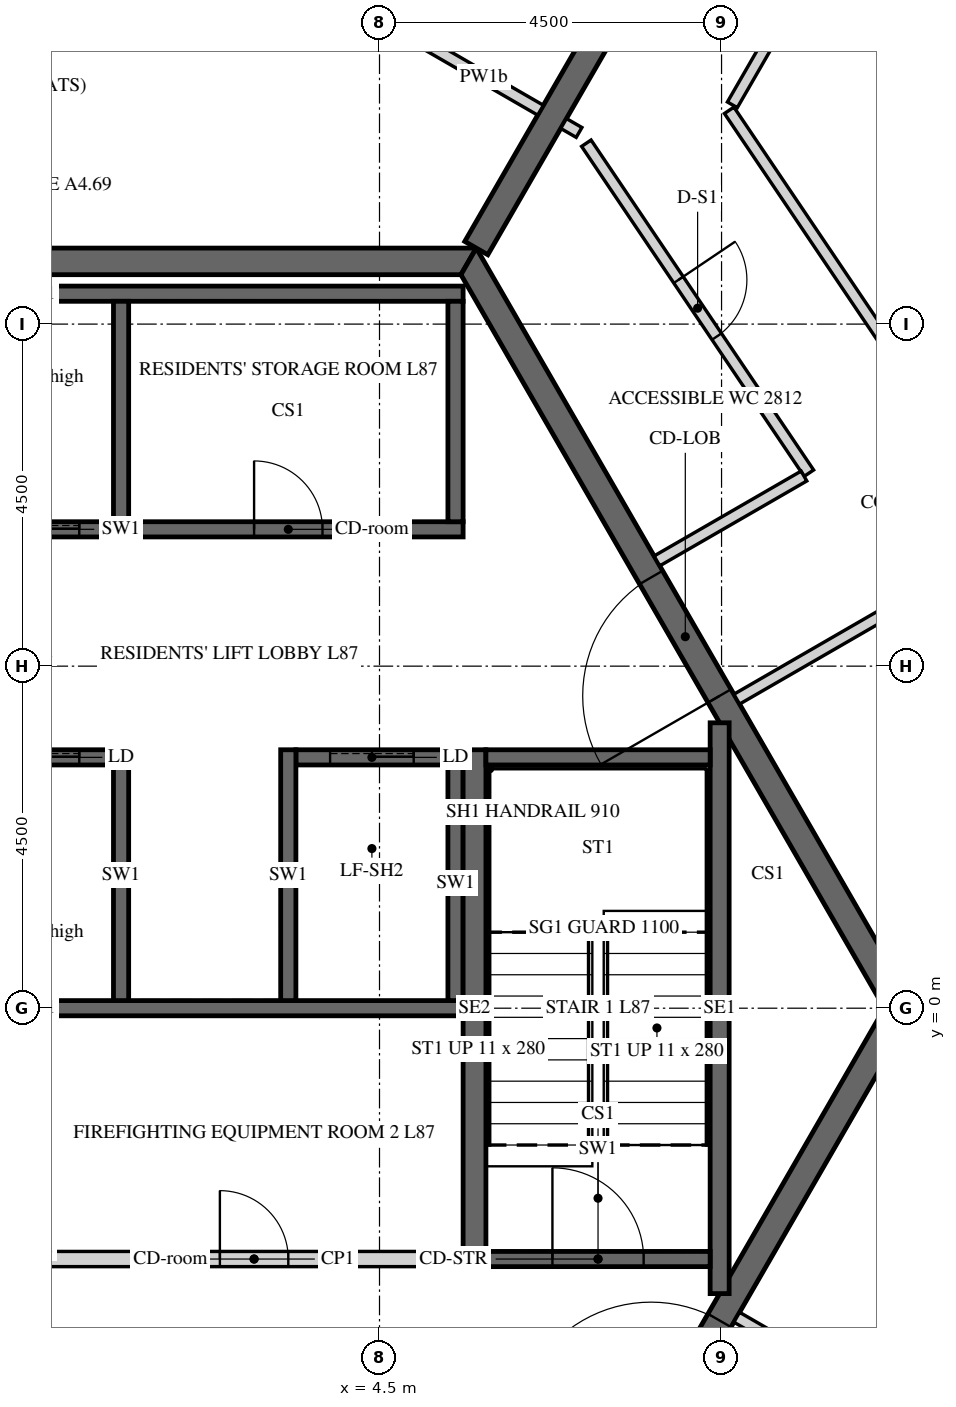
"""IFC4 building model, lengths in metres.
Left out: names, types, materials, properties, quantities, classifications, styles, units other than length and angle.
Written with IfcOpenShell. Run it as: python <this file> out.ifc"""

import sys

from ifc_helpers import new_model, si_unit, direction, frame, frame_2d, origin, place, context, subcontext, project, spatial, polyline, rectangle, outline, extrude, element, fill, save


model = new_model("IFC4")
c1 = context("Model", 3, precision=1e-05, world=origin(), true_north=direction((0.0, 1.0)))
c2 = subcontext(c1, "Body", "Model", "MODEL_VIEW")
j1 = project(units=[si_unit("LENGTHUNIT", "METRE"), si_unit("PLANEANGLEUNIT", "RADIAN")], contexts=[c1])
p1 = place(None, origin())
s1 = spatial("IfcSite", under=j1, at=p1, CompositionType="ELEMENT")
p2 = place(p1, origin())
s2 = spatial("IfcBuilding", under=s1, at=p2, CompositionType="ELEMENT")
p3 = place(p2, frame((0.0, 0.0, 361.2)))
s3 = spatial("IfcBuildingStorey", under=s2, at=p3, CompositionType="ELEMENT", Elevation=361.2)
p4 = place(p3, frame((5.673, -9.825, -0.15), z_axis=(0.0, 0.0, 1.0), x_axis=(0.499995046907, 0.866028263435, 0.0)))
e1 = element("IfcWall", 1, at=p4, inside=s3, PredefinedType="SHEAR", context=c2, shape_type="SweptSolid", body=[
    extrude(outline(polyline([(-0.101, -0.175), (11.446, -0.175), (11.244, 0.175), (0.101, 0.175), (-0.101, -0.175)])), origin(), (0.0, 0.0, 1.0), 3.9),
])
p5 = place(p4, frame((4.801, 0.0, 0.15)))
e2 = element("IfcOpeningElement", 2, at=p5, cuts=e1, PredefinedType="OPENING", context=c2, shape_type="SweptSolid", body=[
    extrude(rectangle(XDim=1.8, YDim=2.4, at=frame_2d((0.9, 1.2))), frame((0.0, 0.185, 0.0), z_axis=(0.0, -1.0, 0.0), x_axis=(1.0, 0.0, 0.0)), (0.0, 0.0, 1.0), 0.37),
])
p6 = place(p3, frame((11.345, 0.0, -0.15), z_axis=(0.0, 0.0, 1.0), x_axis=(-0.499995046907, 0.866028263435, 0.0)))
e3 = element("IfcWall", 3, at=p6, inside=s3, PredefinedType="SHEAR", context=c2, shape_type="SweptSolid", body=[
    extrude(outline(polyline([(-0.101, -0.175), (11.446, -0.175), (11.244, 0.175), (0.101, 0.175), (-0.101, -0.175)])), origin(), (0.0, 0.0, 1.0), 3.9),
])
p7 = place(p6, frame((4.744, 0.0, 0.15)))
e4 = element("IfcOpeningElement", 4, at=p7, cuts=e3, PredefinedType="OPENING", context=c2, shape_type="SweptSolid", body=[
    extrude(rectangle(XDim=1.8, YDim=2.4, at=frame_2d((0.9, 1.2))), frame((0.0, 0.185, 0.0), z_axis=(0.0, -1.0, 0.0), x_axis=(1.0, 0.0, 0.0)), (0.0, 0.0, 1.0), 0.37),
])
p8 = place(p3, frame((5.673, 9.825, -0.15), z_axis=(0.0, 0.0, 1.0), x_axis=(-1.0, 0.0, 0.0)))
e5 = element("IfcWall", 5, at=p8, inside=s3, PredefinedType="SHEAR", context=c2, shape_type="SweptSolid", body=[
    extrude(outline(polyline([(-0.101, -0.175), (11.446, -0.175), (11.244, 0.175), (0.101, 0.175), (-0.101, -0.175)])), origin(), (0.0, 0.0, 1.0), 3.9),
])
p9 = place(p3, frame((5.773, 10.0, -0.15), z_axis=(0.0, 0.0, 1.0), x_axis=(0.500007911273, 0.866020836161, 0.0)))
e6 = element("IfcWall", 6, at=p9, inside=s3, PredefinedType="SHEAR", context=c2, shape_type="SweptSolid", body=[
    extrude(rectangle(XDim=14.51, YDim=0.35, at=frame_2d((7.255, 0.0))), origin(), (0.0, 0.0, 1.0), 3.9),
])
p10 = place(p9, frame((6.355, 0.0, 0.15)))
e7 = element("IfcOpeningElement", 7, at=p10, cuts=e6, PredefinedType="OPENING", context=c2, shape_type="SweptSolid", body=[
    extrude(rectangle(XDim=1.8, YDim=2.4, at=frame_2d((0.9, 1.2))), frame((0.0, 0.185, 0.0), z_axis=(0.0, -1.0, 0.0), x_axis=(1.0, 0.0, 0.0)), (0.0, 0.0, 1.0), 0.37),
])
p11 = place(p3, frame((-5.6, 6.3, -0.25), z_axis=(0.0, 0.0, 1.0), x_axis=(1.0, 0.0, 0.0)))
e8 = element("IfcWall", 8, at=p11, inside=s3, PredefinedType="SHEAR", context=c2, shape_type="SweptSolid", body=[
    extrude(rectangle(XDim=11.2, YDim=0.2, at=frame_2d((5.6, 0.0))), origin(), (0.0, 0.0, 1.0), 3.9),
])
p12 = place(p11, frame((8.45, 0.0, 0.25)))
e9 = element("IfcOpeningElement", 9, at=p12, cuts=e8, PredefinedType="OPENING", context=c2, shape_type="SweptSolid", body=[
    extrude(rectangle(XDim=0.9, YDim=2.1, at=frame_2d((0.45, 1.05))), frame((0.0, 0.11, 0.0), z_axis=(0.0, -1.0, 0.0), x_axis=(1.0, 0.0, 0.0)), (0.0, 0.0, 1.0), 0.22),
])
p13 = place(p11, frame((0.65, 0.0, 0.25)))
e10 = element("IfcOpeningElement", 10, at=p13, cuts=e8, PredefinedType="OPENING", context=c2, shape_type="SweptSolid", body=[
    extrude(rectangle(XDim=1.1, YDim=2.1, at=frame_2d((0.55, 1.05))), frame((0.0, 0.11, 0.0), z_axis=(0.0, -1.0, 0.0), x_axis=(1.0, 0.0, 0.0)), (0.0, 0.0, 1.0), 0.22),
])
p14 = place(p11, frame((2.85, 0.0, 0.25)))
e11 = element("IfcOpeningElement", 11, at=p14, cuts=e8, PredefinedType="OPENING", context=c2, shape_type="SweptSolid", body=[
    extrude(rectangle(XDim=1.1, YDim=2.1, at=frame_2d((0.55, 1.05))), frame((0.0, 0.11, 0.0), z_axis=(0.0, -1.0, 0.0), x_axis=(1.0, 0.0, 0.0)), (0.0, 0.0, 1.0), 0.22),
])
p15 = place(p11, frame((5.05, 0.0, 0.25)))
e12 = element("IfcOpeningElement", 12, at=p15, cuts=e8, PredefinedType="OPENING", context=c2, shape_type="SweptSolid", body=[
    extrude(rectangle(XDim=1.1, YDim=2.1, at=frame_2d((0.55, 1.05))), frame((0.0, 0.11, 0.0), z_axis=(0.0, -1.0, 0.0), x_axis=(1.0, 0.0, 0.0)), (0.0, 0.0, 1.0), 0.22),
])
p16 = place(p3, frame((-5.6, 9.4, -0.25), z_axis=(0.0, 0.0, 1.0), x_axis=(1.0, 0.0, 0.0)))
e13 = element("IfcWall", 13, at=p16, inside=s3, PredefinedType="SHEAR", context=c2, shape_type="SweptSolid", body=[
    extrude(rectangle(XDim=11.2, YDim=0.2, at=frame_2d((5.6, 0.0))), origin(), (0.0, 0.0, 1.0), 3.9),
])
for number, where, z_axis, x_axis in (
    (14, (1.1, 6.4, -0.25), (0.0, 0.0, 1.0), (0.0, 1.0, 0.0)),
    (15, (5.5, 6.4, -0.25), (0.0, 0.0, 1.0), (0.0, 1.0, 0.0)),
):
    element("IfcWall", number, at=place(p3, frame(where, z_axis=z_axis, x_axis=x_axis)), inside=s3, PredefinedType="SHEAR", context=c2, shape_type="SweptSolid", body=[
        extrude(rectangle(XDim=2.9, YDim=0.2, at=frame_2d((1.45, 0.0))), origin(), (0.0, 0.0, 1.0), 3.9),
    ])
p17 = place(p3, frame((-5.6, 3.3, -0.25), z_axis=(0.0, 0.0, 1.0), x_axis=(1.0, 0.0, 0.0)))
e16 = element("IfcWall", 16, at=p17, inside=s3, PredefinedType="SHEAR", context=c2, shape_type="SweptSolid", body=[
    extrude(rectangle(XDim=6.6, YDim=0.2, at=frame_2d((3.3, 0.0))), origin(), (0.0, 0.0, 1.0), 3.9),
])
p18 = place(p17, frame((0.65, 0.0, 0.25)))
e17 = element("IfcOpeningElement", 17, at=p18, cuts=e16, PredefinedType="OPENING", context=c2, shape_type="SweptSolid", body=[
    extrude(rectangle(XDim=1.1, YDim=2.1, at=frame_2d((0.55, 1.05))), frame((0.0, 0.11, 0.0), z_axis=(0.0, -1.0, 0.0), x_axis=(1.0, 0.0, 0.0)), (0.0, 0.0, 1.0), 0.22),
])
p19 = place(p17, frame((2.85, 0.0, 0.25)))
e18 = element("IfcOpeningElement", 18, at=p19, cuts=e16, PredefinedType="OPENING", context=c2, shape_type="SweptSolid", body=[
    extrude(rectangle(XDim=1.1, YDim=2.1, at=frame_2d((0.55, 1.05))), frame((0.0, 0.11, 0.0), z_axis=(0.0, -1.0, 0.0), x_axis=(1.0, 0.0, 0.0)), (0.0, 0.0, 1.0), 0.22),
])
p20 = place(p17, frame((5.05, 0.0, 0.25)))
e19 = element("IfcOpeningElement", 19, at=p20, cuts=e16, PredefinedType="OPENING", context=c2, shape_type="SweptSolid", body=[
    extrude(rectangle(XDim=1.1, YDim=2.1, at=frame_2d((0.55, 1.05))), frame((0.0, 0.11, 0.0), z_axis=(0.0, -1.0, 0.0), x_axis=(1.0, 0.0, 0.0)), (0.0, 0.0, 1.0), 0.22),
])
p21 = place(p3, frame((3.4, 3.3, -0.25), z_axis=(0.0, 0.0, 1.0), x_axis=(1.0, 0.0, 0.0)))
e20 = element("IfcWall", 20, at=p21, inside=s3, PredefinedType="SHEAR", context=c2, shape_type="SweptSolid", body=[
    extrude(rectangle(XDim=2.2, YDim=0.2, at=frame_2d((1.1, 0.0))), origin(), (0.0, 0.0, 1.0), 3.9),
])
p22 = place(p21, frame((0.45, 0.0, 0.25)))
e21 = element("IfcOpeningElement", 21, at=p22, cuts=e20, PredefinedType="OPENING", context=c2, shape_type="SweptSolid", body=[
    extrude(rectangle(XDim=1.1, YDim=2.1, at=frame_2d((0.55, 1.05))), frame((0.0, 0.11, 0.0), z_axis=(0.0, -1.0, 0.0), x_axis=(1.0, 0.0, 0.0)), (0.0, 0.0, 1.0), 0.22),
])
p23 = place(p3, frame((-5.6, 0.0, -0.25), z_axis=(0.0, 0.0, 1.0), x_axis=(1.0, 0.0, 0.0)))
e22 = element("IfcWall", 22, at=p23, inside=s3, PredefinedType="SHEAR", context=c2, shape_type="SweptSolid", body=[
    extrude(rectangle(XDim=11.2, YDim=0.2, at=frame_2d((5.6, 0.0))), origin(), (0.0, 0.0, 1.0), 3.9),
])
for number, where, z_axis, x_axis in (
    (23, (1.1, 0.1, -0.25), (0.0, 0.0, 1.0), (0.0, 1.0, 0.0)),
    (24, (3.3, 0.1, -0.25), (0.0, 0.0, 1.0), (0.0, 1.0, 0.0)),
):
    element("IfcWall", number, at=place(p3, frame(where, z_axis=z_axis, x_axis=x_axis)), inside=s3, PredefinedType="SHEAR", context=c2, shape_type="SweptSolid", body=[
        extrude(rectangle(XDim=3.3, YDim=0.2, at=frame_2d((1.65, 0.0))), origin(), (0.0, 0.0, 1.0), 3.9),
    ])
p24 = place(p3, frame((5.5, 0.1, -0.25), z_axis=(0.0, 0.0, 1.0), x_axis=(0.0, 1.0, 0.0)))
e25 = element("IfcWall", 25, at=p24, inside=s3, PredefinedType="SHEAR", context=c2, shape_type="SweptSolid", body=[
    extrude(rectangle(XDim=3.1, YDim=0.2, at=frame_2d((1.55, 0.0))), origin(), (0.0, 0.0, 1.0), 3.9),
])
p25 = place(p3, frame((0.1, -3.3, 0.0), z_axis=(0.0, 0.0, 1.0), x_axis=(1.0, 0.0, 0.0)))
e26 = element("IfcWall", 26, at=p25, inside=s3, PredefinedType="PARTITIONING", context=c2, shape_type="SweptSolid", body=[
    extrude(rectangle(XDim=5.5, YDim=0.2, at=frame_2d((2.75, 0.0))), origin(), (0.0, 0.0, 1.0), 3.65),
])
p26 = place(p25, frame((2.3, 0.0, 0.0)))
e27 = element("IfcOpeningElement", 27, at=p26, cuts=e26, PredefinedType="OPENING", context=c2, shape_type="SweptSolid", body=[
    extrude(rectangle(XDim=0.9, YDim=2.1, at=frame_2d((0.45, 1.05))), frame((0.0, 0.11, 0.0), z_axis=(0.0, -1.0, 0.0), x_axis=(1.0, 0.0, 0.0)), (0.0, 0.0, 1.0), 0.22),
])
p27 = place(p3, frame((5.75, -3.4, -0.25), z_axis=(0.0, 0.0, 1.0), x_axis=(0.0, 1.0, 0.0)))
e28 = element("IfcWall", 28, at=p27, inside=s3, PredefinedType="SHEAR", context=c2, shape_type="SweptSolid", body=[
    extrude(rectangle(XDim=6.8, YDim=0.3, at=frame_2d((3.4, 0.0))), origin(), (0.0, 0.0, 1.0), 3.9),
])
p28 = place(p3, frame((8.975, -3.755, -0.25), z_axis=(0.0, 0.0, 1.0), x_axis=(0.0, 1.0, 0.0)))
e29 = element("IfcWall", 29, at=p28, inside=s3, PredefinedType="SHEAR", context=c2, shape_type="SweptSolid", body=[
    extrude(rectangle(XDim=7.51, YDim=0.25, at=frame_2d((3.755, 0.0))), origin(), (0.0, 0.0, 1.0), 3.9),
])
p29 = place(p3, frame((5.9, 3.3, -0.25), z_axis=(0.0, 0.0, 1.0), x_axis=(1.0, 0.0, 0.0)))
e30 = element("IfcWall", 30, at=p29, inside=s3, PredefinedType="SHEAR", context=c2, shape_type="SweptSolid", body=[
    extrude(rectangle(XDim=2.95, YDim=0.2, at=frame_2d((1.475, 0.0))), origin(), (0.0, 0.0, 1.0), 3.9),
])
p30 = place(p3, frame((5.9, -3.3, -0.25), z_axis=(0.0, 0.0, 1.0), x_axis=(1.0, 0.0, 0.0)))
e31 = element("IfcWall", 31, at=p30, inside=s3, PredefinedType="SHEAR", context=c2, shape_type="SweptSolid", body=[
    extrude(rectangle(XDim=2.95, YDim=0.2, at=frame_2d((1.475, 0.0))), origin(), (0.0, 0.0, 1.0), 3.9),
])
p31 = place(p30, frame((0.875, 0.0, 0.25)))
e32 = element("IfcOpeningElement", 32, at=p31, cuts=e31, PredefinedType="OPENING", context=c2, shape_type="SweptSolid", body=[
    extrude(rectangle(XDim=1.2, YDim=2.4, at=frame_2d((0.6, 1.2))), frame((0.0, 0.11, 0.0), z_axis=(0.0, -1.0, 0.0), x_axis=(1.0, 0.0, 0.0)), (0.0, 0.0, 1.0), 0.22),
])
p32 = place(p3, frame((5.125, 12.677, 0.0), z_axis=(0.0, 0.0, 1.0), x_axis=(0.866013532718, -0.500020560727, 0.0)))
e33 = element("IfcWall", 33, at=p32, inside=s3, PredefinedType="PARTITIONING", context=c2, shape_type="SweptSolid", body=[
    extrude(rectangle(XDim=1.725, YDim=0.15, at=frame_2d((0.863, 0.0))), origin(), (0.0, 0.0, 1.0), 2.82),
])
p33 = place(p3, frame((10.944, -13.344, 0.0), z_axis=(0.0, 0.0, 1.0), x_axis=(0.500003210163, 0.866023550388, 0.0)))
e34 = element("IfcWall", 34, at=p33, inside=s3, PredefinedType="PARTITIONING", context=c2, shape_type="SweptSolid", body=[
    extrude(rectangle(XDim=13.951, YDim=0.15, at=frame_2d((6.975, 0.0))), origin(), (0.0, 0.0, 1.0), 2.82),
])
p34 = place(p33, frame((1.116, 0.0, 0.0)))
e35 = element("IfcOpeningElement", 35, at=p34, cuts=e34, PredefinedType="OPENING", context=c2, shape_type="SweptSolid", body=[
    extrude(rectangle(XDim=1.0, YDim=2.1, at=frame_2d((0.5, 1.05))), frame((0.0, 0.085, 0.0), z_axis=(0.0, -1.0, 0.0), x_axis=(1.0, 0.0, 0.0)), (0.0, 0.0, 1.0), 0.17),
])
p35 = place(p33, frame((10.416, 0.0, 0.0)))
e36 = element("IfcOpeningElement", 36, at=p35, cuts=e34, PredefinedType="OPENING", context=c2, shape_type="SweptSolid", body=[
    extrude(rectangle(XDim=1.0, YDim=2.1, at=frame_2d((0.5, 1.05))), frame((0.0, 0.085, 0.0), z_axis=(0.0, -1.0, 0.0), x_axis=(1.0, 0.0, 0.0)), (0.0, 0.0, 1.0), 0.17),
])
p36 = place(p3, frame((17.873, -1.193, 0.0), z_axis=(0.0, 0.0, 1.0), x_axis=(-0.559188435605, 0.829040586151, 0.0)))
e37 = element("IfcWall", 37, at=p36, inside=s3, PredefinedType="PARTITIONING", context=c2, shape_type="SweptSolid", body=[
    extrude(rectangle(XDim=15.688, YDim=0.15, at=frame_2d((7.844, 0.0))), origin(), (0.0, 0.0, 1.0), 2.82),
])
p37 = place(p3, frame((9.142, 11.885, 0.0), z_axis=(0.0, 0.0, 1.0), x_axis=(0.500004822225, 0.866022619654, 0.0)))
e38 = element("IfcWall", 38, at=p37, inside=s3, PredefinedType="PARTITIONING", context=c2, shape_type="SweptSolid", body=[
    extrude(rectangle(XDim=5.339, YDim=0.15, at=frame_2d((2.669, 0.0))), origin(), (0.0, 0.0, 1.0), 2.82),
])
p38 = place(p3, frame((9.2, 4.066, 0.0), z_axis=(0.0, 0.0, 1.0), x_axis=(0.866038240688, 0.499977765172, 0.0)))
e39 = element("IfcWall", 39, at=p38, inside=s3, PredefinedType="PARTITIONING", context=c2, shape_type="SweptSolid", body=[
    extrude(rectangle(XDim=2.456, YDim=0.15, at=frame_2d((1.228, 0.0))), origin(), (0.0, 0.0, 1.0), 2.82),
])
p39 = place(p3, frame((12.902, -6.203, 0.0), z_axis=(0.0, 0.0, 1.0), x_axis=(-0.866023907196, 0.500002592159, 0.0)))
e40 = element("IfcWall", 40, at=p39, inside=s3, PredefinedType="PARTITIONING", context=c2, shape_type="SweptSolid", body=[
    extrude(rectangle(XDim=4.275, YDim=0.15, at=frame_2d((2.137, 0.0))), origin(), (0.0, 0.0, 1.0), 2.82),
])
p40 = place(p3, frame((6.922, 11.639, 0.0), z_axis=(0.0, 0.0, 1.0), x_axis=(0.866254745882, -0.499602557277, 0.0)))
e41 = element("IfcWall", 41, at=p40, inside=s3, PredefinedType="PARTITIONING", context=c2, shape_type="SweptSolid", body=[
    extrude(rectangle(XDim=0.235, YDim=0.15, at=frame_2d((0.118, 0.0))), origin(), (0.0, 0.0, 1.0), 2.82),
])
p41 = place(p3, frame((7.221, 11.38, 0.0), z_axis=(0.0, 0.0, 1.0), x_axis=(0.559200548931, -0.829032415576, 0.0)))
e42 = element("IfcWall", 42, at=p41, inside=s3, PredefinedType="PARTITIONING", context=c2, shape_type="SweptSolid", body=[
    extrude(rectangle(XDim=5.236, YDim=0.15, at=frame_2d((2.618, 0.0))), origin(), (0.0, 0.0, 1.0), 2.82),
])
p42 = place(p41, frame((2.168, 0.0, 0.0)))
e43 = element("IfcOpeningElement", 43, at=p42, cuts=e42, PredefinedType="OPENING", context=c2, shape_type="SweptSolid", body=[
    extrude(rectangle(XDim=0.9, YDim=2.1, at=frame_2d((0.45, 1.05))), frame((0.0, 0.085, 0.0), z_axis=(0.0, -1.0, 0.0), x_axis=(1.0, 0.0, 0.0)), (0.0, 0.0, 1.0), 0.17),
])
p43 = place(p3, frame((10.084, 7.001, 0.0), z_axis=(0.0, 0.0, 1.0), x_axis=(-0.865994457699, -0.500053596362, 0.0)))
e44 = element("IfcWall", 44, at=p43, inside=s3, PredefinedType="PARTITIONING", context=c2, shape_type="SweptSolid", body=[
    extrude(rectangle(XDim=2.234, YDim=0.15, at=frame_2d((1.117, 0.0))), origin(), (0.0, 0.0, 1.0), 2.82),
])
p44 = place(p7, origin())
e45 = element("IfcDoor", 45, at=p44, inside=s3, OperationType="DOUBLE_DOOR_SINGLE_SWING", PredefinedType="DOOR", context=c2, shape_type="SweptSolid", body=[
    extrude(rectangle(XDim=1.8, YDim=2.4, at=frame_2d((0.9, 1.2))), frame((0.0, 0.025, 0.0), z_axis=(0.0, -1.0, 0.0), x_axis=(1.0, 0.0, 0.0)), (0.0, 0.0, 1.0), 0.05),
])
fill(e4, e45)
p45 = place(p5, origin())
e46 = element("IfcDoor", 46, at=p45, inside=s3, OperationType="DOUBLE_DOOR_SINGLE_SWING", PredefinedType="DOOR", context=c2, shape_type="SweptSolid", body=[
    extrude(rectangle(XDim=1.8, YDim=2.4, at=frame_2d((0.9, 1.2))), frame((0.0, 0.025, 0.0), z_axis=(0.0, -1.0, 0.0), x_axis=(1.0, 0.0, 0.0)), (0.0, 0.0, 1.0), 0.05),
])
fill(e2, e46)
p46 = place(p26, origin())
e47 = element("IfcDoor", 47, at=p46, inside=s3, OperationType="SINGLE_SWING_LEFT", PredefinedType="DOOR", context=c2, shape_type="SweptSolid", body=[
    extrude(rectangle(XDim=0.9, YDim=2.1, at=frame_2d((0.45, 1.05))), frame((0.0, 0.025, 0.0), z_axis=(0.0, -1.0, 0.0), x_axis=(1.0, 0.0, 0.0)), (0.0, 0.0, 1.0), 0.05),
])
fill(e27, e47)
p47 = place(p12, origin())
e48 = element("IfcDoor", 48, at=p47, inside=s3, OperationType="SINGLE_SWING_LEFT", PredefinedType="DOOR", context=c2, shape_type="SweptSolid", body=[
    extrude(rectangle(XDim=0.9, YDim=2.1, at=frame_2d((0.45, 1.05))), frame((0.0, 0.025, 0.0), z_axis=(0.0, -1.0, 0.0), x_axis=(1.0, 0.0, 0.0)), (0.0, 0.0, 1.0), 0.05),
])
fill(e9, e48)
p48 = place(p31, origin())
e49 = element("IfcDoor", 49, at=p48, inside=s3, OperationType="SINGLE_SWING_LEFT", PredefinedType="DOOR", context=c2, shape_type="SweptSolid", body=[
    extrude(rectangle(XDim=1.2, YDim=2.4, at=frame_2d((0.6, 1.2))), frame((0.0, 0.025, 0.0), z_axis=(0.0, -1.0, 0.0), x_axis=(1.0, 0.0, 0.0)), (0.0, 0.0, 1.0), 0.05),
])
fill(e32, e49)
p49 = place(p15, origin())
e50 = element("IfcDoor", 50, at=p49, inside=s3, OperationType="SLIDING_TO_LEFT", PredefinedType="DOOR", context=c2, shape_type="SweptSolid", body=[
    extrude(rectangle(XDim=1.1, YDim=2.1, at=frame_2d((0.55, 1.05))), frame((0.0, 0.025, 0.0), z_axis=(0.0, -1.0, 0.0), x_axis=(1.0, 0.0, 0.0)), (0.0, 0.0, 1.0), 0.05),
])
fill(e12, e50)
p50 = place(p20, origin())
e51 = element("IfcDoor", 51, at=p50, inside=s3, OperationType="SLIDING_TO_LEFT", PredefinedType="DOOR", context=c2, shape_type="SweptSolid", body=[
    extrude(rectangle(XDim=1.1, YDim=2.1, at=frame_2d((0.55, 1.05))), frame((0.0, 0.025, 0.0), z_axis=(0.0, -1.0, 0.0), x_axis=(1.0, 0.0, 0.0)), (0.0, 0.0, 1.0), 0.05),
])
fill(e19, e51)
p51 = place(p22, origin())
e52 = element("IfcDoor", 52, at=p51, inside=s3, OperationType="SLIDING_TO_LEFT", PredefinedType="DOOR", context=c2, shape_type="SweptSolid", body=[
    extrude(rectangle(XDim=1.1, YDim=2.1, at=frame_2d((0.55, 1.05))), frame((0.0, 0.025, 0.0), z_axis=(0.0, -1.0, 0.0), x_axis=(1.0, 0.0, 0.0)), (0.0, 0.0, 1.0), 0.05),
])
fill(e21, e52)
p52 = place(p42, origin())
e53 = element("IfcDoor", 53, at=p52, inside=s3, OperationType="SINGLE_SWING_RIGHT", PredefinedType="DOOR", context=c2, shape_type="SweptSolid", body=[
    extrude(rectangle(XDim=0.9, YDim=2.1, at=frame_2d((0.45, 1.05))), frame((0.0, 0.025, 0.0), z_axis=(0.0, -1.0, 0.0), x_axis=(1.0, 0.0, 0.0)), (0.0, 0.0, 1.0), 0.05),
])
fill(e43, e53)
save(model, sys.argv[1])
